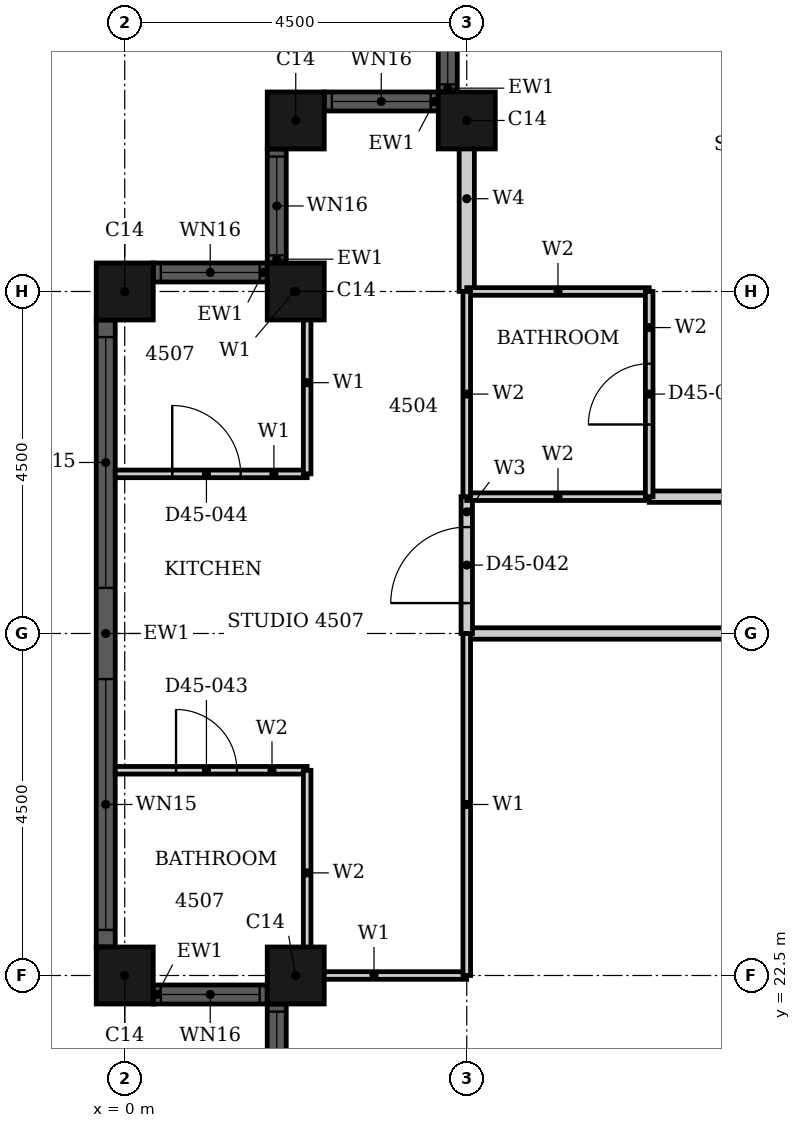
"""IFC4 building model, lengths in metres.
Left out: names, types, materials, properties, quantities, classifications, styles, units other than length and angle.
Written with IfcOpenShell. Run it as: python <this file> out.ifc"""

import sys

from ifc_helpers import new_model, si_unit, direction, frame, frame_2d, origin, origin_2d, place, context, subcontext, project, spatial, rectangle, hollow_rectangle, extrude, element, fill, save


model = new_model("IFC4")
c1 = context("Model", 3, precision=1e-05, world=origin(), true_north=direction((0.0, 1.0)))
c2 = subcontext(c1, "Body", "Model", "MODEL_VIEW")
j1 = project(units=[si_unit("LENGTHUNIT", "METRE"), si_unit("PLANEANGLEUNIT", "RADIAN")], contexts=[c1])
p1 = place(None, origin())
s1 = spatial("IfcSite", under=j1, at=p1, CompositionType="ELEMENT")
p2 = place(p1, origin())
s2 = spatial("IfcBuilding", under=s1, at=p2, CompositionType="ELEMENT")
p3 = place(p2, frame((0.0, 0.0, 180.2)))
s3 = spatial("IfcBuildingStorey", under=s2, at=p3, CompositionType="ELEMENT", Elevation=180.2)
for number, where, z_axis, x_axis in (
    (1, (4.5, 33.75, 0.0), (0.0, 0.0, 1.0), (1.0, 0.0, 0.0)),
    (2, (2.25, 33.75, 0.0), (0.0, 0.0, 1.0), (1.0, 0.0, 0.0)),
    (3, (2.25, 31.5, 0.0), (0.0, 0.0, 1.0), (1.0, 0.0, 0.0)),
    (4, (0.0, 31.5, 0.0), (0.0, 0.0, 1.0), (1.0, 0.0, 0.0)),
    (5, (0.0, 22.5, 0.0), (0.0, 0.0, 1.0), (1.0, 0.0, 0.0)),
    (6, (2.25, 22.5, 0.0), (0.0, 0.0, 1.0), (1.0, 0.0, 0.0)),
):
    element("IfcColumn", number, at=place(p3, frame(where, z_axis=z_axis, x_axis=x_axis)), inside=s3, PredefinedType="COLUMN", context=c2, shape_type="SweptSolid", body=[
        extrude(hollow_rectangle(XDim=0.75, YDim=0.75, WallThickness=0.024, at=origin_2d()), origin(), (0.0, 0.0, 1.0), 3.7),
    ])
p4 = place(p3, frame((4.25, 35.625, 0.0), z_axis=(0.0, 0.0, 1.0), x_axis=(0.0, -1.0, 0.0)))
e7 = element("IfcWall", 7, at=p4, inside=s3, PredefinedType="SOLIDWALL", context=c2, shape_type="SweptSolid", body=[
    extrude(rectangle(XDim=1.5, YDim=0.25, at=frame_2d((0.75, 0.0))), origin(), (0.0, 0.0, 1.0), 3.7),
])
p5 = place(p4, frame((0.1, 0.0, 0.9)))
e8 = element("IfcOpeningElement", 8, at=p5, cuts=e7, PredefinedType="OPENING", context=c2, shape_type="SweptSolid", body=[
    extrude(rectangle(XDim=1.3, YDim=1.85, at=frame_2d((0.65, 0.925))), frame((0.0, 0.135, 0.0), z_axis=(0.0, -1.0, 0.0), x_axis=(1.0, 0.0, 0.0)), (0.0, 0.0, 1.0), 0.27),
])
p6 = place(p3, frame((4.125, 34.0, 0.0), z_axis=(0.0, 0.0, 1.0), x_axis=(-1.0, 0.0, 0.0)))
e9 = element("IfcWall", 9, at=p6, inside=s3, PredefinedType="SOLIDWALL", context=c2, shape_type="SweptSolid", body=[
    extrude(rectangle(XDim=1.5, YDim=0.25, at=frame_2d((0.75, 0.0))), origin(), (0.0, 0.0, 1.0), 3.7),
])
p7 = place(p6, frame((0.1, 0.0, 0.9)))
e10 = element("IfcOpeningElement", 10, at=p7, cuts=e9, PredefinedType="OPENING", context=c2, shape_type="SweptSolid", body=[
    extrude(rectangle(XDim=1.3, YDim=1.85, at=frame_2d((0.65, 0.925))), frame((0.0, 0.135, 0.0), z_axis=(0.0, -1.0, 0.0), x_axis=(1.0, 0.0, 0.0)), (0.0, 0.0, 1.0), 0.27),
])
p8 = place(p3, frame((2.0, 33.375, 0.0), z_axis=(0.0, 0.0, 1.0), x_axis=(0.0, -1.0, 0.0)))
e11 = element("IfcWall", 11, at=p8, inside=s3, PredefinedType="SOLIDWALL", context=c2, shape_type="SweptSolid", body=[
    extrude(rectangle(XDim=1.5, YDim=0.25, at=frame_2d((0.75, 0.0))), origin(), (0.0, 0.0, 1.0), 3.7),
])
p9 = place(p8, frame((0.1, 0.0, 0.9)))
e12 = element("IfcOpeningElement", 12, at=p9, cuts=e11, PredefinedType="OPENING", context=c2, shape_type="SweptSolid", body=[
    extrude(rectangle(XDim=1.3, YDim=1.85, at=frame_2d((0.65, 0.925))), frame((0.0, 0.135, 0.0), z_axis=(0.0, -1.0, 0.0), x_axis=(1.0, 0.0, 0.0)), (0.0, 0.0, 1.0), 0.27),
])
p10 = place(p3, frame((1.875, 31.75, 0.0), z_axis=(0.0, 0.0, 1.0), x_axis=(-1.0, 0.0, 0.0)))
e13 = element("IfcWall", 13, at=p10, inside=s3, PredefinedType="SOLIDWALL", context=c2, shape_type="SweptSolid", body=[
    extrude(rectangle(XDim=1.5, YDim=0.25, at=frame_2d((0.75, 0.0))), origin(), (0.0, 0.0, 1.0), 3.7),
])
p11 = place(p10, frame((0.1, 0.0, 0.9)))
e14 = element("IfcOpeningElement", 14, at=p11, cuts=e13, PredefinedType="OPENING", context=c2, shape_type="SweptSolid", body=[
    extrude(rectangle(XDim=1.3, YDim=1.85, at=frame_2d((0.65, 0.925))), frame((0.0, 0.135, 0.0), z_axis=(0.0, -1.0, 0.0), x_axis=(1.0, 0.0, 0.0)), (0.0, 0.0, 1.0), 0.27),
])
p12 = place(p3, frame((-0.25, 31.125, 0.0), z_axis=(0.0, 0.0, 1.0), x_axis=(0.0, -1.0, 0.0)))
e15 = element("IfcWall", 15, at=p12, inside=s3, PredefinedType="SOLIDWALL", context=c2, shape_type="SweptSolid", body=[
    extrude(rectangle(XDim=8.25, YDim=0.25, at=frame_2d((4.125, 0.0))), origin(), (0.0, 0.0, 1.0), 3.7),
])
p13 = place(p12, frame((0.225, 0.0, 0.45)))
e16 = element("IfcOpeningElement", 16, at=p13, cuts=e15, PredefinedType="OPENING", context=c2, shape_type="SweptSolid", body=[
    extrude(rectangle(XDim=3.3, YDim=2.3, at=frame_2d((1.65, 1.15))), frame((0.0, 0.135, 0.0), z_axis=(0.0, -1.0, 0.0), x_axis=(1.0, 0.0, 0.0)), (0.0, 0.0, 1.0), 0.27),
])
p14 = place(p12, frame((4.725, 0.0, 0.45)))
e17 = element("IfcOpeningElement", 17, at=p14, cuts=e15, PredefinedType="OPENING", context=c2, shape_type="SweptSolid", body=[
    extrude(rectangle(XDim=3.3, YDim=2.3, at=frame_2d((1.65, 1.15))), frame((0.0, 0.135, 0.0), z_axis=(0.0, -1.0, 0.0), x_axis=(1.0, 0.0, 0.0)), (0.0, 0.0, 1.0), 0.27),
])
p15 = place(p3, frame((0.375, 22.25, 0.0), z_axis=(0.0, 0.0, 1.0), x_axis=(1.0, 0.0, 0.0)))
e18 = element("IfcWall", 18, at=p15, inside=s3, PredefinedType="SOLIDWALL", context=c2, shape_type="SweptSolid", body=[
    extrude(rectangle(XDim=1.5, YDim=0.25, at=frame_2d((0.75, 0.0))), origin(), (0.0, 0.0, 1.0), 3.7),
])
p16 = place(p15, frame((0.1, 0.0, 0.9)))
e19 = element("IfcOpeningElement", 19, at=p16, cuts=e18, PredefinedType="OPENING", context=c2, shape_type="SweptSolid", body=[
    extrude(rectangle(XDim=1.3, YDim=1.85, at=frame_2d((0.65, 0.925))), frame((0.0, 0.135, 0.0), z_axis=(0.0, -1.0, 0.0), x_axis=(1.0, 0.0, 0.0)), (0.0, 0.0, 1.0), 0.27),
])
p17 = place(p3, frame((2.0, 22.125, 0.0), z_axis=(0.0, 0.0, 1.0), x_axis=(0.0, -1.0, 0.0)))
e20 = element("IfcWall", 20, at=p17, inside=s3, PredefinedType="SOLIDWALL", context=c2, shape_type="SweptSolid", body=[
    extrude(rectangle(XDim=1.5, YDim=0.25, at=frame_2d((0.75, 0.0))), origin(), (0.0, 0.0, 1.0), 3.7),
])
p18 = place(p17, frame((0.1, 0.0, 0.9)))
e21 = element("IfcOpeningElement", 21, at=p18, cuts=e20, PredefinedType="OPENING", context=c2, shape_type="SweptSolid", body=[
    extrude(rectangle(XDim=1.3, YDim=1.85, at=frame_2d((0.65, 0.925))), frame((0.0, 0.135, 0.0), z_axis=(0.0, -1.0, 0.0), x_axis=(1.0, 0.0, 0.0)), (0.0, 0.0, 1.0), 0.27),
])
p19 = place(p3, frame((4.5, 27.0, 0.0), z_axis=(0.0, 0.0, 1.0), x_axis=(1.0, 0.0, 0.0)))
e22 = element("IfcWall", 22, at=p19, inside=s3, PredefinedType="PARTITIONING", context=c2, shape_type="SweptSolid", body=[
    extrude(rectangle(XDim=13.5, YDim=0.15, at=frame_2d((6.75, 0.0))), origin(), (0.0, 0.0, 1.0), 2.68),
])
p20 = place(p19, frame((5.35, 0.0, 0.0)))
e23 = element("IfcOpeningElement", 23, at=p20, cuts=e22, PredefinedType="OPENING", context=c2, shape_type="SweptSolid", body=[
    extrude(rectangle(XDim=1.0, YDim=2.1, at=frame_2d((0.5, 1.05))), frame((0.0, 0.085, 0.0), z_axis=(0.0, -1.0, 0.0), x_axis=(1.0, 0.0, 0.0)), (0.0, 0.0, 1.0), 0.17),
])
p21 = place(p3, frame((6.9, 28.8, 0.0), z_axis=(0.0, 0.0, 1.0), x_axis=(1.0, 0.0, 0.0)))
e24 = element("IfcWall", 24, at=p21, inside=s3, PredefinedType="PARTITIONING", context=c2, shape_type="SweptSolid", body=[
    extrude(rectangle(XDim=9.299, YDim=0.15, at=frame_2d((4.649, 0.0))), origin(), (0.0, 0.0, 1.0), 3.4),
])
p22 = place(p3, frame((4.5, 27.0, 0.0), z_axis=(0.0, 0.0, 1.0), x_axis=(0.0, 1.0, 0.0)))
e25 = element("IfcWall", 25, at=p22, inside=s3, PredefinedType="PARTITIONING", context=c2, shape_type="SweptSolid", body=[
    extrude(rectangle(XDim=1.8, YDim=0.15, at=frame_2d((0.9, 0.0))), origin(), (0.0, 0.0, 1.0), 3.4),
])
p23 = place(p22, frame((0.4, 0.0, 0.0)))
e26 = element("IfcOpeningElement", 26, at=p23, cuts=e25, PredefinedType="OPENING", context=c2, shape_type="SweptSolid", body=[
    extrude(rectangle(XDim=1.0, YDim=2.2, at=frame_2d((0.5, 1.1))), frame((0.0, 0.085, 0.0), z_axis=(0.0, -1.0, 0.0), x_axis=(1.0, 0.0, 0.0)), (0.0, 0.0, 1.0), 0.17),
])
p24 = place(p3, frame((2.06, 22.5, 0.0), z_axis=(0.0, 0.0, 1.0), x_axis=(1.0, 0.0, 0.0)))
e27 = element("IfcWall", 27, at=p24, inside=s3, PredefinedType="PARTITIONING", context=c2, shape_type="SweptSolid", body=[
    extrude(rectangle(XDim=2.439, YDim=0.1, at=frame_2d((1.219, 0.0))), origin(), (0.0, 0.0, 1.0), 2.68),
])
p25 = place(p3, frame((-0.125, 29.1, 0.0), z_axis=(0.0, 0.0, 1.0), x_axis=(1.0, 0.0, 0.0)))
e28 = element("IfcWall", 28, at=p25, inside=s3, PredefinedType="PARTITIONING", context=c2, shape_type="SweptSolid", body=[
    extrude(rectangle(XDim=2.525, YDim=0.1, at=frame_2d((1.262, 0.0))), origin(), (0.0, 0.0, 1.0), 3.4),
])
p26 = place(p25, frame((0.75, 0.0, 0.0)))
e29 = element("IfcOpeningElement", 29, at=p26, cuts=e28, PredefinedType="OPENING", context=c2, shape_type="SweptSolid", body=[
    extrude(rectangle(XDim=0.9, YDim=2.1, at=frame_2d((0.45, 1.05))), frame((0.0, 0.06, 0.0), z_axis=(0.0, -1.0, 0.0), x_axis=(1.0, 0.0, 0.0)), (0.0, 0.0, 1.0), 0.12),
])
p27 = place(p3, frame((2.06, 31.5, 0.0), z_axis=(0.0, 0.0, 1.0), x_axis=(1.0, 0.0, 0.0)))
e30 = element("IfcWall", 30, at=p27, inside=s3, PredefinedType="PARTITIONING", context=c2, shape_type="SweptSolid", body=[
    extrude(rectangle(XDim=0.34, YDim=0.1, at=frame_2d((0.17, 0.0))), origin(), (0.0, 0.0, 1.0), 3.4),
])
p28 = place(p3, frame((2.4, 29.1, 0.0), z_axis=(0.0, 0.0, 1.0), x_axis=(0.0, 1.0, 0.0)))
e31 = element("IfcWall", 31, at=p28, inside=s3, PredefinedType="PARTITIONING", context=c2, shape_type="SweptSolid", body=[
    extrude(rectangle(XDim=2.4, YDim=0.1, at=frame_2d((1.2, 0.0))), origin(), (0.0, 0.0, 1.0), 3.4),
])
p29 = place(p3, frame((4.5, 22.5, 0.0), z_axis=(0.0, 0.0, 1.0), x_axis=(0.0, 1.0, 0.0)))
e32 = element("IfcWall", 32, at=p29, inside=s3, PredefinedType="PARTITIONING", context=c2, shape_type="SweptSolid", body=[
    extrude(rectangle(XDim=4.5, YDim=0.1, at=frame_2d((2.25, 0.0))), origin(), (0.0, 0.0, 1.0), 3.4),
])
p30 = place(p3, frame((4.5, 31.501, 0.0), z_axis=(0.0, 0.0, 1.0), x_axis=(0.0, 1.0, 0.0)))
e33 = element("IfcWall", 33, at=p30, inside=s3, PredefinedType="PARTITIONING", context=c2, shape_type="SweptSolid", body=[
    extrude(rectangle(XDim=2.439, YDim=0.2, at=frame_2d((1.219, 0.0))), origin(), (0.0, 0.0, 1.0), 3.4),
])
p31 = place(p3, frame((-0.125, 25.2, 0.0), z_axis=(0.0, 0.0, 1.0), x_axis=(1.0, 0.0, 0.0)))
e34 = element("IfcWall", 34, at=p31, inside=s3, PredefinedType="PARTITIONING", context=c2, shape_type="SweptSolid", body=[
    extrude(rectangle(XDim=2.525, YDim=0.1, at=frame_2d((1.262, 0.0))), origin(), (0.0, 0.0, 1.0), 3.4),
])
p32 = place(p31, frame((0.8, 0.0, 0.0)))
e35 = element("IfcOpeningElement", 35, at=p32, cuts=e34, PredefinedType="OPENING", context=c2, shape_type="SweptSolid", body=[
    extrude(rectangle(XDim=0.8, YDim=2.1, at=frame_2d((0.4, 1.05))), frame((0.0, 0.06, 0.0), z_axis=(0.0, -1.0, 0.0), x_axis=(1.0, 0.0, 0.0)), (0.0, 0.0, 1.0), 0.12),
])
p33 = place(p3, frame((4.5, 28.8, 0.0), z_axis=(0.0, 0.0, 1.0), x_axis=(1.0, 0.0, 0.0)))
e36 = element("IfcWall", 36, at=p33, inside=s3, PredefinedType="PARTITIONING", context=c2, shape_type="SweptSolid", body=[
    extrude(rectangle(XDim=2.4, YDim=0.1, at=frame_2d((1.2, 0.0))), origin(), (0.0, 0.0, 1.0), 3.4),
])
p34 = place(p3, frame((4.5, 31.5, 0.0), z_axis=(0.0, 0.0, 1.0), x_axis=(1.0, 0.0, 0.0)))
e37 = element("IfcWall", 37, at=p34, inside=s3, PredefinedType="PARTITIONING", context=c2, shape_type="SweptSolid", body=[
    extrude(rectangle(XDim=2.4, YDim=0.1, at=frame_2d((1.2, 0.0))), origin(), (0.0, 0.0, 1.0), 2.68),
])
for number, where, z_axis, x_axis in (
    (38, (2.4, 22.5, 0.0), (0.0, 0.0, 1.0), (0.0, 1.0, 0.0)),
    (39, (4.5, 28.8, 0.0), (0.0, 0.0, 1.0), (0.0, 1.0, 0.0)),
):
    element("IfcWall", number, at=place(p3, frame(where, z_axis=z_axis, x_axis=x_axis)), inside=s3, PredefinedType="PARTITIONING", context=c2, shape_type="SweptSolid", body=[
        extrude(rectangle(XDim=2.7, YDim=0.1, at=frame_2d((1.35, 0.0))), origin(), (0.0, 0.0, 1.0), 3.4),
    ])
p35 = place(p3, frame((6.9, 28.8, 0.0), z_axis=(0.0, 0.0, 1.0), x_axis=(0.0, 1.0, 0.0)))
e40 = element("IfcWall", 40, at=p35, inside=s3, PredefinedType="PARTITIONING", context=c2, shape_type="SweptSolid", body=[
    extrude(rectangle(XDim=2.7, YDim=0.1, at=frame_2d((1.35, 0.0))), origin(), (0.0, 0.0, 1.0), 3.4),
])
p36 = place(p35, frame((0.95, 0.0, 0.0)))
e41 = element("IfcOpeningElement", 41, at=p36, cuts=e40, PredefinedType="OPENING", context=c2, shape_type="SweptSolid", body=[
    extrude(rectangle(XDim=0.8, YDim=2.1, at=frame_2d((0.4, 1.05))), frame((0.0, 0.06, 0.0), z_axis=(0.0, -1.0, 0.0), x_axis=(1.0, 0.0, 0.0)), (0.0, 0.0, 1.0), 0.12),
])
p37 = place(p5, origin())
e42 = element("IfcWindow", 42, at=p37, inside=s3, PartitioningType="SINGLE_PANEL", PredefinedType="WINDOW", context=c2, shape_type="SweptSolid", body=[
    extrude(rectangle(XDim=1.3, YDim=1.85, at=frame_2d((0.65, 0.925))), frame((0.0, 0.03, 0.0), z_axis=(0.0, -1.0, 0.0), x_axis=(1.0, 0.0, 0.0)), (0.0, 0.0, 1.0), 0.06),
])
fill(e8, e42)
p38 = place(p7, origin())
e43 = element("IfcWindow", 43, at=p38, inside=s3, PartitioningType="SINGLE_PANEL", PredefinedType="WINDOW", context=c2, shape_type="SweptSolid", body=[
    extrude(rectangle(XDim=1.3, YDim=1.85, at=frame_2d((0.65, 0.925))), frame((0.0, 0.03, 0.0), z_axis=(0.0, -1.0, 0.0), x_axis=(1.0, 0.0, 0.0)), (0.0, 0.0, 1.0), 0.06),
])
fill(e10, e43)
p39 = place(p9, origin())
e44 = element("IfcWindow", 44, at=p39, inside=s3, PartitioningType="SINGLE_PANEL", PredefinedType="WINDOW", context=c2, shape_type="SweptSolid", body=[
    extrude(rectangle(XDim=1.3, YDim=1.85, at=frame_2d((0.65, 0.925))), frame((0.0, 0.03, 0.0), z_axis=(0.0, -1.0, 0.0), x_axis=(1.0, 0.0, 0.0)), (0.0, 0.0, 1.0), 0.06),
])
fill(e12, e44)
p40 = place(p11, origin())
e45 = element("IfcWindow", 45, at=p40, inside=s3, PartitioningType="SINGLE_PANEL", PredefinedType="WINDOW", context=c2, shape_type="SweptSolid", body=[
    extrude(rectangle(XDim=1.3, YDim=1.85, at=frame_2d((0.65, 0.925))), frame((0.0, 0.03, 0.0), z_axis=(0.0, -1.0, 0.0), x_axis=(1.0, 0.0, 0.0)), (0.0, 0.0, 1.0), 0.06),
])
fill(e14, e45)
p41 = place(p13, origin())
e46 = element("IfcWindow", 46, at=p41, inside=s3, PartitioningType="SINGLE_PANEL", PredefinedType="WINDOW", context=c2, shape_type="SweptSolid", body=[
    extrude(rectangle(XDim=3.3, YDim=2.3, at=frame_2d((1.65, 1.15))), frame((0.0, 0.03, 0.0), z_axis=(0.0, -1.0, 0.0), x_axis=(1.0, 0.0, 0.0)), (0.0, 0.0, 1.0), 0.06),
])
fill(e16, e46)
p42 = place(p14, origin())
e47 = element("IfcWindow", 47, at=p42, inside=s3, PartitioningType="SINGLE_PANEL", PredefinedType="WINDOW", context=c2, shape_type="SweptSolid", body=[
    extrude(rectangle(XDim=3.3, YDim=2.3, at=frame_2d((1.65, 1.15))), frame((0.0, 0.03, 0.0), z_axis=(0.0, -1.0, 0.0), x_axis=(1.0, 0.0, 0.0)), (0.0, 0.0, 1.0), 0.06),
])
fill(e17, e47)
p43 = place(p16, origin())
e48 = element("IfcWindow", 48, at=p43, inside=s3, PartitioningType="SINGLE_PANEL", PredefinedType="WINDOW", context=c2, shape_type="SweptSolid", body=[
    extrude(rectangle(XDim=1.3, YDim=1.85, at=frame_2d((0.65, 0.925))), frame((0.0, 0.03, 0.0), z_axis=(0.0, -1.0, 0.0), x_axis=(1.0, 0.0, 0.0)), (0.0, 0.0, 1.0), 0.06),
])
fill(e19, e48)
p44 = place(p18, origin())
e49 = element("IfcWindow", 49, at=p44, inside=s3, PartitioningType="SINGLE_PANEL", PredefinedType="WINDOW", context=c2, shape_type="SweptSolid", body=[
    extrude(rectangle(XDim=1.3, YDim=1.85, at=frame_2d((0.65, 0.925))), frame((0.0, 0.03, 0.0), z_axis=(0.0, -1.0, 0.0), x_axis=(1.0, 0.0, 0.0)), (0.0, 0.0, 1.0), 0.06),
])
fill(e21, e49)
p45 = place(p36, origin())
e50 = element("IfcDoor", 50, at=p45, inside=s3, OperationType="SINGLE_SWING_RIGHT", PredefinedType="DOOR", context=c2, shape_type="SweptSolid", body=[
    extrude(rectangle(XDim=0.8, YDim=2.1, at=frame_2d((0.4, 1.05))), frame((0.0, 0.025, 0.0), z_axis=(0.0, -1.0, 0.0), x_axis=(1.0, 0.0, 0.0)), (0.0, 0.0, 1.0), 0.05),
])
fill(e41, e50)
p46 = place(p23, origin())
e51 = element("IfcDoor", 51, at=p46, inside=s3, OperationType="SINGLE_SWING_LEFT", PredefinedType="DOOR", context=c2, shape_type="SweptSolid", body=[
    extrude(rectangle(XDim=1.0, YDim=2.2, at=frame_2d((0.5, 1.1))), frame((0.0, 0.025, 0.0), z_axis=(0.0, -1.0, 0.0), x_axis=(1.0, 0.0, 0.0)), (0.0, 0.0, 1.0), 0.05),
])
fill(e26, e51)
p47 = place(p32, origin())
e52 = element("IfcDoor", 52, at=p47, inside=s3, OperationType="SINGLE_SWING_LEFT", PredefinedType="DOOR", context=c2, shape_type="SweptSolid", body=[
    extrude(rectangle(XDim=0.8, YDim=2.1, at=frame_2d((0.4, 1.05))), frame((0.0, 0.025, 0.0), z_axis=(0.0, -1.0, 0.0), x_axis=(1.0, 0.0, 0.0)), (0.0, 0.0, 1.0), 0.05),
])
fill(e35, e52)
p48 = place(p26, origin())
e53 = element("IfcDoor", 53, at=p48, inside=s3, OperationType="SINGLE_SWING_LEFT", PredefinedType="DOOR", context=c2, shape_type="SweptSolid", body=[
    extrude(rectangle(XDim=0.9, YDim=2.1, at=frame_2d((0.45, 1.05))), frame((0.0, 0.025, 0.0), z_axis=(0.0, -1.0, 0.0), x_axis=(1.0, 0.0, 0.0)), (0.0, 0.0, 1.0), 0.05),
])
fill(e29, e53)
save(model, sys.argv[1])
